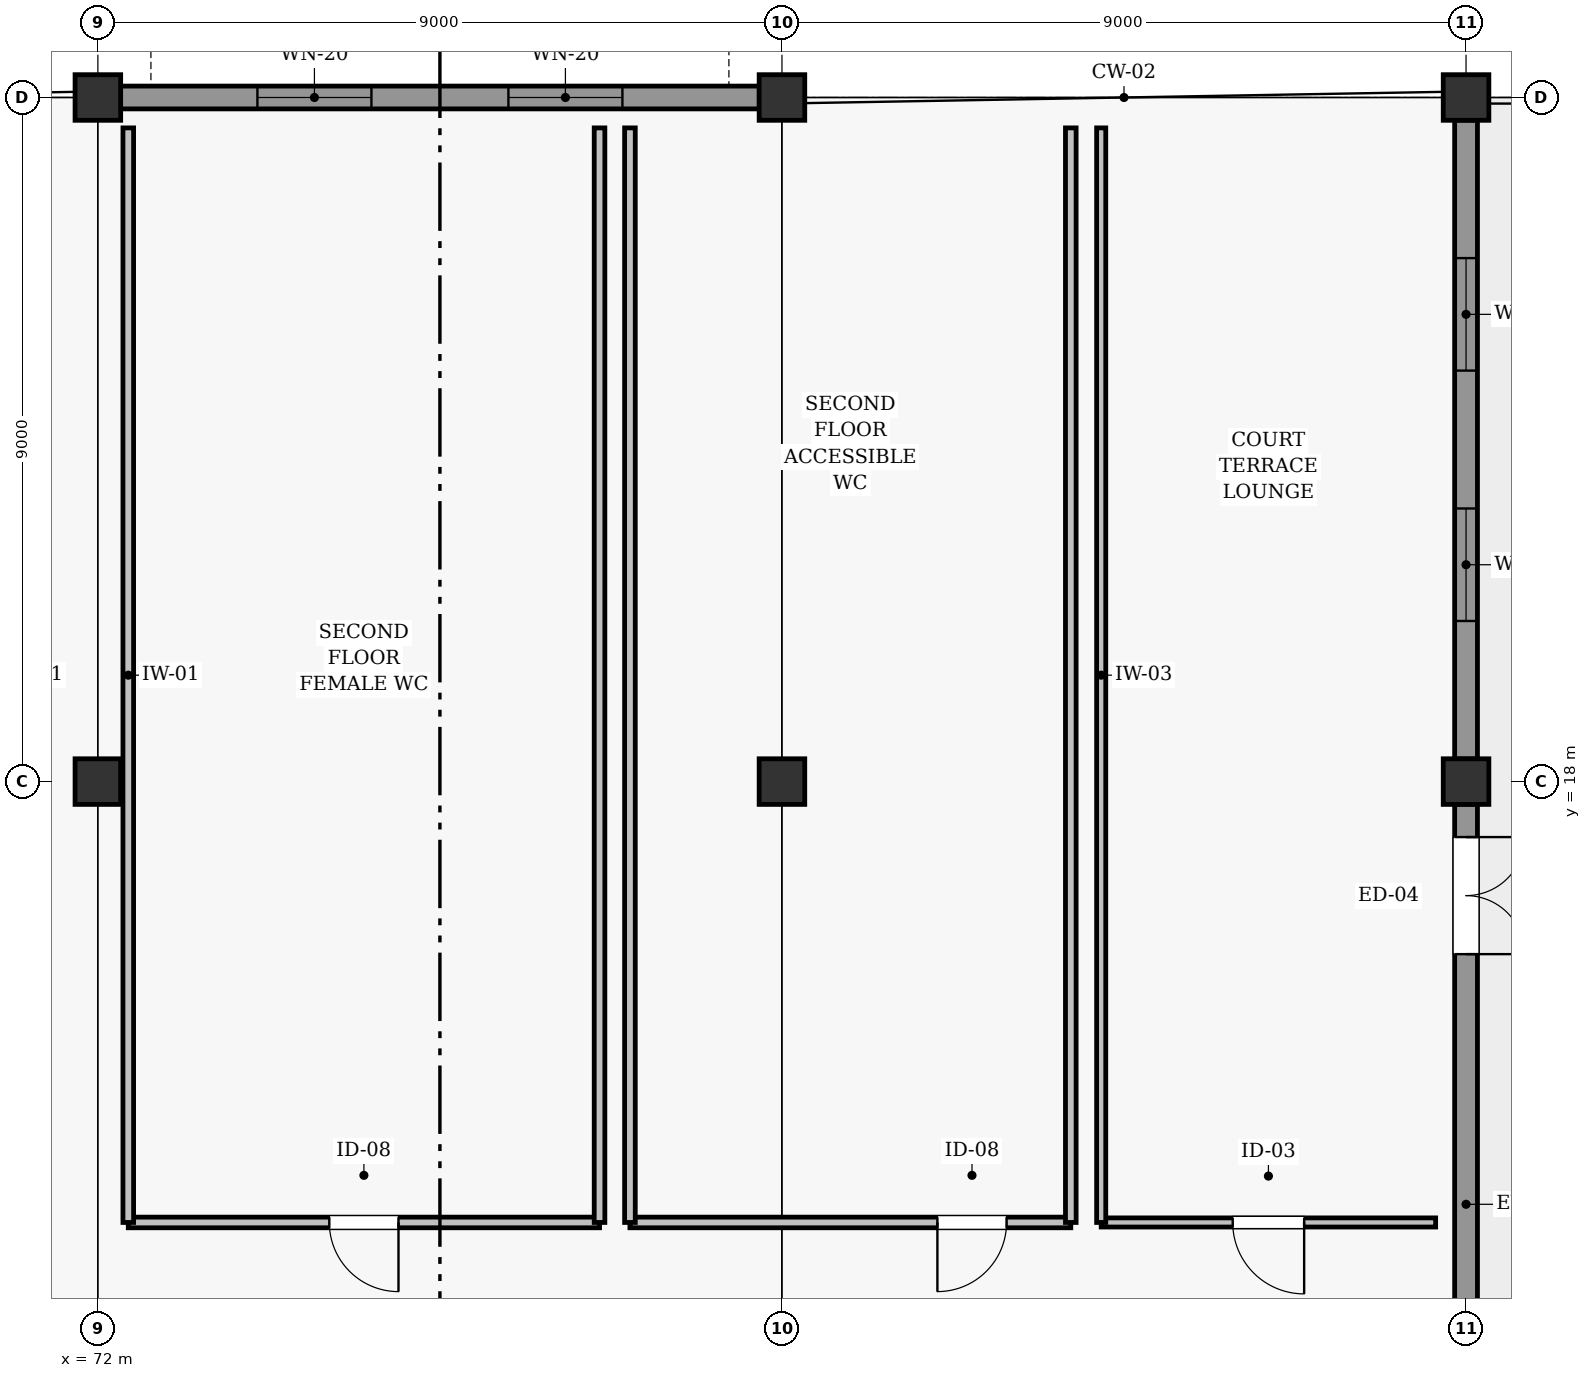
"""IFC4 building model, lengths in metres.
Left out: names, types, materials, properties, quantities, classifications, styles, units other than length and angle.
Written with IfcOpenShell. Run it as: python <this file> out.ifc"""

import sys

from ifc_helpers import new_model, si_unit, direction, frame, frame_2d, origin, origin_2d, place, context, subcontext, project, spatial, rectangle, extrude, element, fill, save


model = new_model("IFC4")
c1 = context("Model", 3, precision=1e-05, world=origin(), true_north=direction((0.0, 1.0)))
c2 = subcontext(c1, "Body", "Model", "MODEL_VIEW")
j1 = project(units=[si_unit("LENGTHUNIT", "METRE"), si_unit("PLANEANGLEUNIT", "RADIAN")], contexts=[c1])
p1 = place(None, origin())
s1 = spatial("IfcSite", under=j1, at=p1, CompositionType="ELEMENT")
p2 = place(p1, origin())
s2 = spatial("IfcBuilding", under=s1, at=p2, CompositionType="ELEMENT")
p3 = place(p2, frame((0.0, 0.0, 8.4)))
s3 = spatial("IfcBuildingStorey", under=s2, at=p3, CompositionType="ELEMENT", Elevation=8.4)
for number, where, z_axis, x_axis in (
    (1, (72.0, 18.0, 0.0), (0.0, 0.0, 1.0), (1.0, 0.0, 0.0)),
    (2, (72.0, 27.0, 0.0), (0.0, 0.0, 1.0), (1.0, 0.0, 0.0)),
    (3, (81.0, 18.0, 0.0), (0.0, 0.0, 1.0), (1.0, 0.0, 0.0)),
    (4, (81.0, 27.0, 0.0), (0.0, 0.0, 1.0), (1.0, 0.0, 0.0)),
    (5, (90.0, 18.0, 0.0), (0.0, 0.0, 1.0), (1.0, 0.0, 0.0)),
    (6, (90.0, 27.0, 0.0), (0.0, 0.0, 1.0), (1.0, 0.0, 0.0)),
):
    element("IfcColumn", number, at=place(p3, frame(where, z_axis=z_axis, x_axis=x_axis)), inside=s3, PredefinedType="COLUMN", context=c2, shape_type="SweptSolid", body=[
        extrude(rectangle(XDim=0.6, YDim=0.6, at=origin_2d()), origin(), (0.0, 0.0, 1.0), 3.6),
    ])
p4 = place(p3, frame((72.298, 27.0, 0.0), z_axis=(0.0, 0.0, 1.0), x_axis=(1.0, 0.0, 0.0)))
e7 = element("IfcWall", 7, at=p4, inside=s3, PredefinedType="SOLIDWALL", context=c2, shape_type="SweptSolid", body=[
    extrude(rectangle(XDim=8.404, YDim=0.3, at=frame_2d((4.202, 0.0))), origin(), (0.0, 0.0, 1.0), 2.902),
])
p5 = place(p4, frame((1.801, 0.0, 0.85)))
e8 = element("IfcOpeningElement", 8, at=p5, cuts=e7, PredefinedType="OPENING", context=c2, shape_type="SweptSolid", body=[
    extrude(rectangle(XDim=1.5, YDim=1.55, at=frame_2d((0.75, 0.775))), frame((0.0, 0.16, 0.0), z_axis=(0.0, -1.0, 0.0), x_axis=(1.0, 0.0, 0.0)), (0.0, 0.0, 1.0), 0.32),
])
p6 = place(p4, frame((5.103, 0.0, 0.85)))
e9 = element("IfcOpeningElement", 9, at=p6, cuts=e7, PredefinedType="OPENING", context=c2, shape_type="SweptSolid", body=[
    extrude(rectangle(XDim=1.5, YDim=1.55, at=frame_2d((0.75, 0.775))), frame((0.0, 0.16, 0.0), z_axis=(0.0, -1.0, 0.0), x_axis=(1.0, 0.0, 0.0)), (0.0, 0.0, 1.0), 0.32),
])
p7 = place(p3, frame((90.0, 9.298, 0.0), z_axis=(0.0, 0.0, 1.0), x_axis=(0.0, 1.0, 0.0)))
e10 = element("IfcWall", 10, at=p7, inside=s3, PredefinedType="SOLIDWALL", context=c2, shape_type="SweptSolid", body=[
    extrude(rectangle(XDim=8.404, YDim=0.3, at=frame_2d((4.202, 0.0))), origin(), (0.0, 0.0, 1.0), 2.902),
])
p8 = place(p7, frame((6.432, 0.0, 0.0)))
e11 = element("IfcOpeningElement", 11, at=p8, cuts=e10, PredefinedType="OPENING", context=c2, shape_type="SweptSolid", body=[
    extrude(rectangle(XDim=1.54, YDim=2.12, at=frame_2d((0.77, 1.06))), frame((0.0, 0.16, 0.0), z_axis=(0.0, -1.0, 0.0), x_axis=(1.0, 0.0, 0.0)), (0.0, 0.0, 1.0), 0.32),
])
p9 = place(p3, frame((90.0, 18.298, 0.0), z_axis=(0.0, 0.0, 1.0), x_axis=(0.0, 1.0, 0.0)))
e12 = element("IfcWall", 12, at=p9, inside=s3, PredefinedType="SOLIDWALL", context=c2, shape_type="SweptSolid", body=[
    extrude(rectangle(XDim=8.404, YDim=0.3, at=frame_2d((4.202, 0.0))), origin(), (0.0, 0.0, 1.0), 2.902),
])
p10 = place(p9, frame((1.815, 0.0, 0.85)))
e13 = element("IfcOpeningElement", 13, at=p10, cuts=e12, PredefinedType="OPENING", context=c2, shape_type="SweptSolid", body=[
    extrude(rectangle(XDim=1.48, YDim=1.56, at=frame_2d((0.74, 0.78))), frame((0.0, 0.16, 0.0), z_axis=(0.0, -1.0, 0.0), x_axis=(1.0, 0.0, 0.0)), (0.0, 0.0, 1.0), 0.32),
])
p11 = place(p9, frame((5.109, 0.0, 0.85)))
e14 = element("IfcOpeningElement", 14, at=p11, cuts=e12, PredefinedType="OPENING", context=c2, shape_type="SweptSolid", body=[
    extrude(rectangle(XDim=1.48, YDim=1.56, at=frame_2d((0.74, 0.78))), frame((0.0, 0.16, 0.0), z_axis=(0.0, -1.0, 0.0), x_axis=(1.0, 0.0, 0.0)), (0.0, 0.0, 1.0), 0.32),
])
p12 = place(p3, frame((85.2, 12.2, 0.0), z_axis=(0.0, 0.0, 1.0), x_axis=(1.0, 0.0, 0.0)))
e15 = element("IfcWall", 15, at=p12, inside=s3, PredefinedType="PARTITIONING", context=c2, shape_type="SweptSolid", body=[
    extrude(rectangle(XDim=4.4, YDim=0.12, at=frame_2d((2.2, 0.0))), origin(), (0.0, 0.0, 1.0), 3.35),
])
p13 = place(p12, frame((1.73, 0.0, 0.0)))
e16 = element("IfcOpeningElement", 16, at=p13, cuts=e15, PredefinedType="OPENING", context=c2, shape_type="SweptSolid", body=[
    extrude(rectangle(XDim=0.94, YDim=2.06, at=frame_2d((0.47, 1.03))), frame((0.0, 0.07, 0.0), z_axis=(0.0, -1.0, 0.0), x_axis=(1.0, 0.0, 0.0)), (0.0, 0.0, 1.0), 0.14),
])
p14 = place(p3, frame((85.2, 12.2, 0.0), z_axis=(0.0, 0.0, 1.0), x_axis=(0.0, 1.0, 0.0)))
e17 = element("IfcWall", 17, at=p14, inside=s3, PredefinedType="PARTITIONING", context=c2, shape_type="SweptSolid", body=[
    extrude(rectangle(XDim=14.4, YDim=0.12, at=frame_2d((7.2, 0.0))), origin(), (0.0, 0.0, 1.0), 2.905),
])
p15 = place(p3, frame((72.4, 12.2, 0.0), z_axis=(0.0, 0.0, 1.0), x_axis=(1.0, 0.0, 0.0)))
e18 = element("IfcWall", 18, at=p15, inside=s3, PredefinedType="PARTITIONING", context=c2, shape_type="SweptSolid", body=[
    extrude(rectangle(XDim=6.2, YDim=0.14, at=frame_2d((3.1, 0.0))), origin(), (0.0, 0.0, 1.0), 3.095),
])
p16 = place(p15, frame((2.645, 0.0, 0.0)))
e19 = element("IfcOpeningElement", 19, at=p16, cuts=e18, PredefinedType="OPENING", context=c2, shape_type="SweptSolid", body=[
    extrude(rectangle(XDim=0.91, YDim=2.04, at=frame_2d((0.455, 1.02))), frame((0.0, 0.08, 0.0), z_axis=(0.0, -1.0, 0.0), x_axis=(1.0, 0.0, 0.0)), (0.0, 0.0, 1.0), 0.16),
])
for number, where, z_axis, x_axis in (
    (20, (72.4, 12.2, 0.0), (0.0, 0.0, 1.0), (0.0, 1.0, 0.0)),
    (21, (78.6, 12.2, 0.0), (0.0, 0.0, 1.0), (0.0, 1.0, 0.0)),
):
    element("IfcWall", number, at=place(p3, frame(where, z_axis=z_axis, x_axis=x_axis)), inside=s3, PredefinedType="PARTITIONING", context=c2, shape_type="SweptSolid", body=[
        extrude(rectangle(XDim=14.4, YDim=0.14, at=frame_2d((7.2, 0.0))), origin(), (0.0, 0.0, 1.0), 2.865),
    ])
p17 = place(p3, frame((79.0, 12.2, 0.0), z_axis=(0.0, 0.0, 1.0), x_axis=(1.0, 0.0, 0.0)))
e22 = element("IfcWall", 22, at=p17, inside=s3, PredefinedType="PARTITIONING", context=c2, shape_type="SweptSolid", body=[
    extrude(rectangle(XDim=5.8, YDim=0.14, at=frame_2d((2.9, 0.0))), origin(), (0.0, 0.0, 1.0), 2.845),
])
p18 = place(p17, frame((4.045, 0.0, 0.0)))
e23 = element("IfcOpeningElement", 23, at=p18, cuts=e22, PredefinedType="OPENING", context=c2, shape_type="SweptSolid", body=[
    extrude(rectangle(XDim=0.91, YDim=2.04, at=frame_2d((0.455, 1.02))), frame((0.0, 0.08, 0.0), z_axis=(0.0, -1.0, 0.0), x_axis=(1.0, 0.0, 0.0)), (0.0, 0.0, 1.0), 0.16),
])
p19 = place(p3, frame((79.0, 12.2, 0.0), z_axis=(0.0, 0.0, 1.0), x_axis=(0.0, 1.0, 0.0)))
e24 = element("IfcWall", 24, at=p19, inside=s3, PredefinedType="PARTITIONING", context=c2, shape_type="SweptSolid", body=[
    extrude(rectangle(XDim=14.4, YDim=0.14, at=frame_2d((7.2, 0.0))), origin(), (0.0, 0.0, 1.0), 2.865),
])
p20 = place(p3, frame((84.8, 12.2, 0.0), z_axis=(0.0, 0.0, 1.0), x_axis=(0.0, 1.0, 0.0)))
e25 = element("IfcWall", 25, at=p20, inside=s3, PredefinedType="PARTITIONING", context=c2, shape_type="SweptSolid", body=[
    extrude(rectangle(XDim=14.4, YDim=0.14, at=frame_2d((7.2, 0.0))), origin(), (0.0, 0.0, 1.0), 2.905),
])
p21 = place(p5, origin())
e26 = element("IfcWindow", 26, at=p21, inside=s3, PartitioningType="SINGLE_PANEL", PredefinedType="WINDOW", context=c2, shape_type="SweptSolid", body=[
    extrude(rectangle(XDim=1.5, YDim=1.55, at=frame_2d((0.75, 0.775))), frame((0.0, 0.03, 0.0), z_axis=(0.0, -1.0, 0.0), x_axis=(1.0, 0.0, 0.0)), (0.0, 0.0, 1.0), 0.06),
])
fill(e8, e26)
p22 = place(p6, origin())
e27 = element("IfcWindow", 27, at=p22, inside=s3, PartitioningType="SINGLE_PANEL", PredefinedType="WINDOW", context=c2, shape_type="SweptSolid", body=[
    extrude(rectangle(XDim=1.5, YDim=1.55, at=frame_2d((0.75, 0.775))), frame((0.0, 0.03, 0.0), z_axis=(0.0, -1.0, 0.0), x_axis=(1.0, 0.0, 0.0)), (0.0, 0.0, 1.0), 0.06),
])
fill(e9, e27)
p23 = place(p8, frame((1.54, 0.0, 0.0), z_axis=(0.0, 0.0, 1.0), x_axis=(-1.0, 0.0, 0.0)))
e28 = element("IfcDoor", 28, at=p23, inside=s3, OperationType="DOUBLE_SWING_LEFT", PredefinedType="DOOR", context=c2, shape_type="SweptSolid", body=[
    extrude(rectangle(XDim=1.54, YDim=2.12, at=frame_2d((0.77, 1.06))), frame((0.0, 0.025, 0.0), z_axis=(0.0, -1.0, 0.0), x_axis=(1.0, 0.0, 0.0)), (0.0, 0.0, 1.0), 0.05),
])
fill(e11, e28)
p24 = place(p10, origin())
e29 = element("IfcWindow", 29, at=p24, inside=s3, PartitioningType="SINGLE_PANEL", PredefinedType="WINDOW", context=c2, shape_type="SweptSolid", body=[
    extrude(rectangle(XDim=1.48, YDim=1.56, at=frame_2d((0.74, 0.78))), frame((0.0, 0.03, 0.0), z_axis=(0.0, -1.0, 0.0), x_axis=(1.0, 0.0, 0.0)), (0.0, 0.0, 1.0), 0.06),
])
fill(e13, e29)
p25 = place(p11, origin())
e30 = element("IfcWindow", 30, at=p25, inside=s3, PartitioningType="SINGLE_PANEL", PredefinedType="WINDOW", context=c2, shape_type="SweptSolid", body=[
    extrude(rectangle(XDim=1.48, YDim=1.56, at=frame_2d((0.74, 0.78))), frame((0.0, 0.03, 0.0), z_axis=(0.0, -1.0, 0.0), x_axis=(1.0, 0.0, 0.0)), (0.0, 0.0, 1.0), 0.06),
])
fill(e14, e30)
p26 = place(p13, frame((0.94, 0.0, 0.0), z_axis=(0.0, 0.0, 1.0), x_axis=(-1.0, 0.0, 0.0)))
e31 = element("IfcDoor", 31, at=p26, inside=s3, OperationType="SINGLE_SWING_RIGHT", PredefinedType="DOOR", context=c2, shape_type="SweptSolid", body=[
    extrude(rectangle(XDim=0.94, YDim=2.06, at=frame_2d((0.47, 1.03))), frame((0.0, 0.025, 0.0), z_axis=(0.0, -1.0, 0.0), x_axis=(1.0, 0.0, 0.0)), (0.0, 0.0, 1.0), 0.05),
])
fill(e16, e31)
p27 = place(p16, frame((0.91, 0.0, 0.0), z_axis=(0.0, 0.0, 1.0), x_axis=(-1.0, 0.0, 0.0)))
e32 = element("IfcDoor", 32, at=p27, inside=s3, OperationType="SINGLE_SWING_RIGHT", PredefinedType="DOOR", context=c2, shape_type="SweptSolid", body=[
    extrude(rectangle(XDim=0.91, YDim=2.04, at=frame_2d((0.455, 1.02))), frame((0.0, 0.025, 0.0), z_axis=(0.0, -1.0, 0.0), x_axis=(1.0, 0.0, 0.0)), (0.0, 0.0, 1.0), 0.05),
])
fill(e19, e32)
p28 = place(p18, frame((0.91, 0.0, 0.0), z_axis=(0.0, 0.0, 1.0), x_axis=(-1.0, 0.0, 0.0)))
e33 = element("IfcDoor", 33, at=p28, inside=s3, OperationType="SINGLE_SWING_LEFT", PredefinedType="DOOR", context=c2, shape_type="SweptSolid", body=[
    extrude(rectangle(XDim=0.91, YDim=2.04, at=frame_2d((0.455, 1.02))), frame((0.0, 0.025, 0.0), z_axis=(0.0, -1.0, 0.0), x_axis=(1.0, 0.0, 0.0)), (0.0, 0.0, 1.0), 0.05),
])
fill(e23, e33)
save(model, sys.argv[1])
